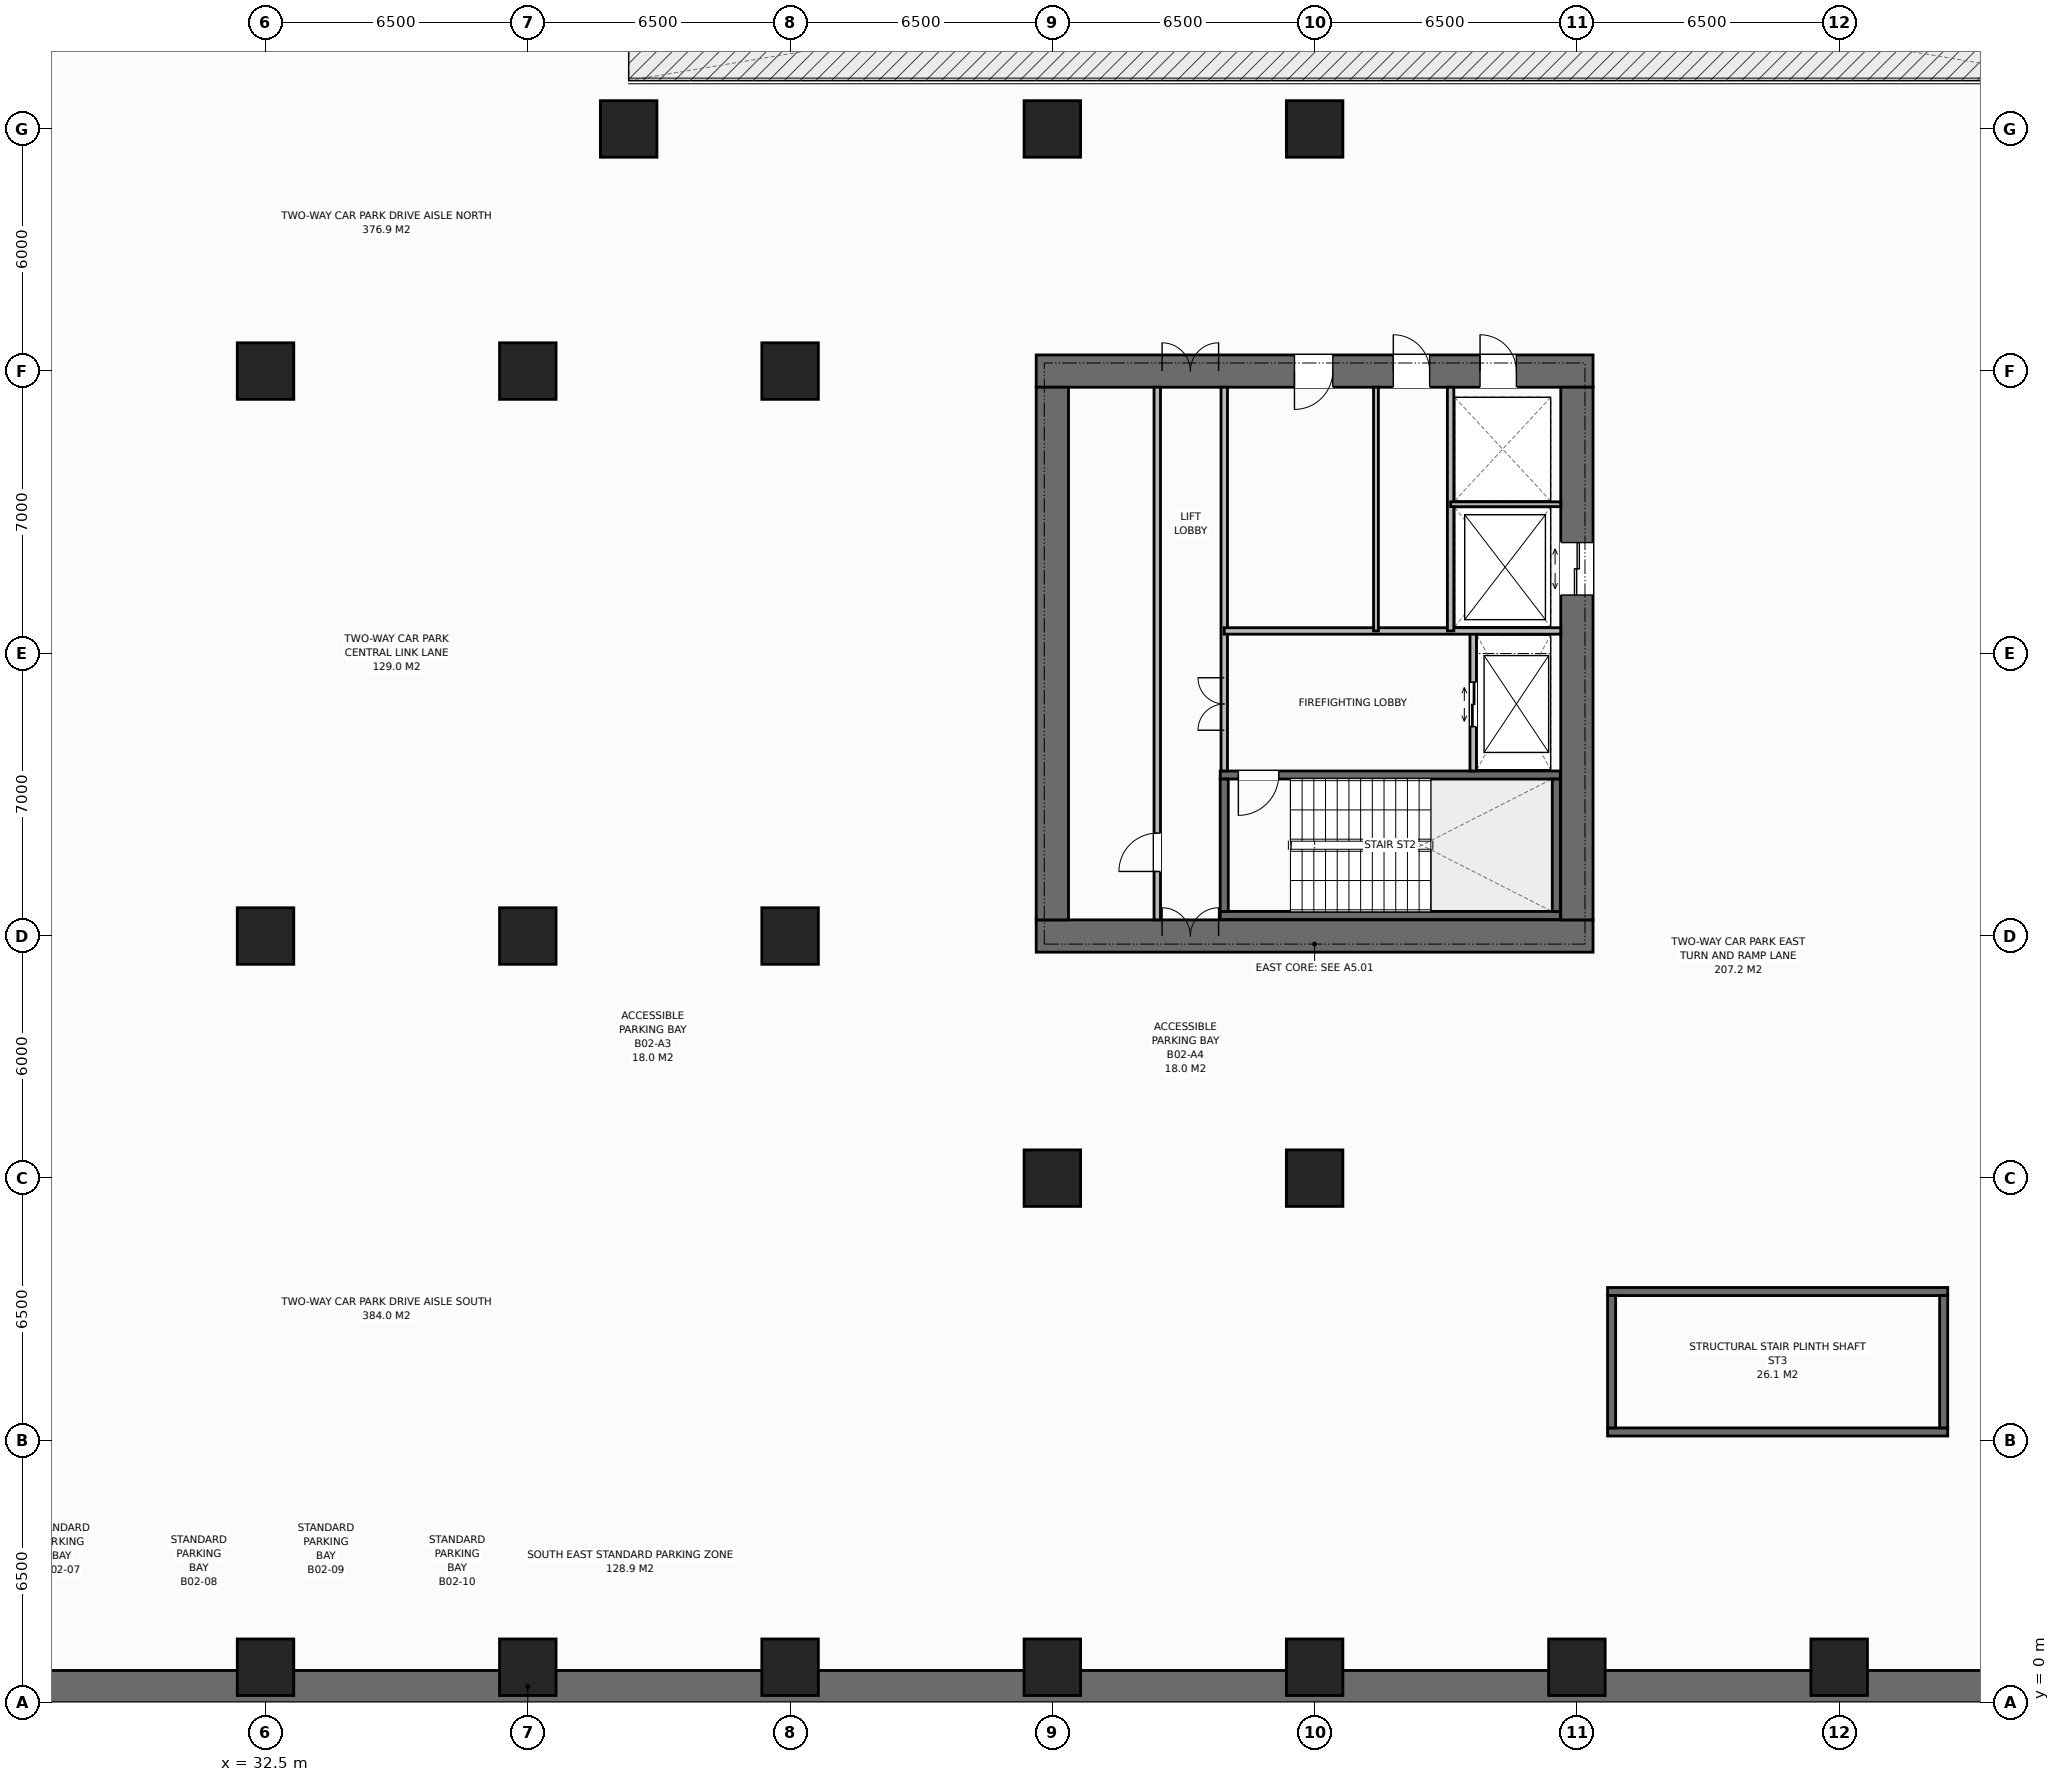
"""IFC4 building model, lengths in metres.
Left out: names, types, materials, properties, quantities, classifications, styles, units other than length and angle.
Written with IfcOpenShell. Run it as: python <this file> out.ifc"""

import sys

from ifc_helpers import new_model, si_unit, direction, frame, frame_2d, origin, origin_2d, place, context, subcontext, project, spatial, rectangle, extrude, element, fill, save


model = new_model("IFC4")
c1 = context("Model", 3, precision=1e-05, world=origin(), true_north=direction((0.0, 1.0)))
c2 = subcontext(c1, "Body", "Model", "MODEL_VIEW")
j1 = project(units=[si_unit("LENGTHUNIT", "METRE"), si_unit("PLANEANGLEUNIT", "RADIAN")], contexts=[c1])
p1 = place(None, origin())
s1 = spatial("IfcSite", under=j1, at=p1, CompositionType="ELEMENT")
p2 = place(p1, origin())
s2 = spatial("IfcBuilding", under=s1, at=p2, CompositionType="ELEMENT")
p3 = place(p2, frame((0.0, 0.0, -9.0)))
s3 = spatial("IfcBuildingStorey", under=s2, at=p3, CompositionType="ELEMENT", Elevation=-9.0)
p4 = place(p3, frame((-0.2, 0.4, 0.0), z_axis=(0.0, 0.0, 1.0), x_axis=(1.0, 0.0, 0.0)))
e1 = element("IfcWall", 1, at=p4, inside=s3, PredefinedType="USERDEFINED", context=c2, shape_type="SweptSolid", body=[
    extrude(rectangle(XDim=78.4, YDim=0.8, at=frame_2d((39.2, 0.0))), origin(), (0.0, 0.0, 1.0), 4.2),
])
p5 = place(p3, frame((51.6, 19.0, 0.0), z_axis=(0.0, 0.0, 1.0), x_axis=(1.0, 0.0, 0.0)))
e2 = element("IfcWall", 2, at=p5, inside=s3, PredefinedType="SHEAR", context=c2, shape_type="SweptSolid", body=[
    extrude(rectangle(XDim=13.8, YDim=0.8, at=frame_2d((6.9, 0.0))), origin(), (0.0, 0.0, 1.0), 4.5),
])
p6 = place(p5, frame((3.12, 0.0, 0.0)))
e3 = element("IfcOpeningElement", 3, at=p6, cuts=e2, PredefinedType="OPENING", context=c2, shape_type="SweptSolid", body=[
    extrude(rectangle(XDim=1.4, YDim=2.2, at=frame_2d((0.7, 1.1))), frame((0.0, 0.41, 0.0), z_axis=(0.0, -1.0, 0.0), x_axis=(1.0, 0.0, 0.0)), (0.0, 0.0, 1.0), 0.82),
])
p7 = place(p3, frame((51.6, 33.0, 0.0), z_axis=(0.0, 0.0, 1.0), x_axis=(1.0, 0.0, 0.0)))
e4 = element("IfcWall", 4, at=p7, inside=s3, PredefinedType="SHEAR", context=c2, shape_type="SweptSolid", body=[
    extrude(rectangle(XDim=13.8, YDim=0.8, at=frame_2d((6.9, 0.0))), origin(), (0.0, 0.0, 1.0), 4.5),
])
p8 = place(p7, frame((3.12, 0.0, 0.0)))
e5 = element("IfcOpeningElement", 5, at=p8, cuts=e4, PredefinedType="OPENING", context=c2, shape_type="SweptSolid", body=[
    extrude(rectangle(XDim=1.4, YDim=2.2, at=frame_2d((0.7, 1.1))), frame((0.0, 0.41, 0.0), z_axis=(0.0, -1.0, 0.0), x_axis=(1.0, 0.0, 0.0)), (0.0, 0.0, 1.0), 0.82),
])
p9 = place(p7, frame((11.0, 0.0, 0.0)))
e6 = element("IfcOpeningElement", 6, at=p9, cuts=e4, PredefinedType="OPENING", context=c2, shape_type="SweptSolid", body=[
    extrude(rectangle(XDim=0.9, YDim=2.15, at=frame_2d((0.45, 1.075))), frame((0.0, 0.41, 0.0), z_axis=(0.0, -1.0, 0.0), x_axis=(1.0, 0.0, 0.0)), (0.0, 0.0, 1.0), 0.82),
])
p10 = place(p7, frame((6.4, 0.0, 0.0)))
e7 = element("IfcOpeningElement", 7, at=p10, cuts=e4, PredefinedType="OPENING", context=c2, shape_type="SweptSolid", body=[
    extrude(rectangle(XDim=0.95, YDim=2.15, at=frame_2d((0.475, 1.075))), frame((0.0, 0.41, 0.0), z_axis=(0.0, -1.0, 0.0), x_axis=(1.0, 0.0, 0.0)), (0.0, 0.0, 1.0), 0.82),
])
p11 = place(p7, frame((8.85, 0.0, 0.0)))
e8 = element("IfcOpeningElement", 8, at=p11, cuts=e4, PredefinedType="OPENING", context=c2, shape_type="SweptSolid", body=[
    extrude(rectangle(XDim=0.9, YDim=2.15, at=frame_2d((0.45, 1.075))), frame((0.0, 0.41, 0.0), z_axis=(0.0, -1.0, 0.0), x_axis=(1.0, 0.0, 0.0)), (0.0, 0.0, 1.0), 0.82),
])
p12 = place(p3, frame((52.0, 19.4, 0.0), z_axis=(0.0, 0.0, 1.0), x_axis=(0.0, 1.0, 0.0)))
e9 = element("IfcWall", 9, at=p12, inside=s3, PredefinedType="SHEAR", context=c2, shape_type="SweptSolid", body=[
    extrude(rectangle(XDim=13.2, YDim=0.8, at=frame_2d((6.6, 0.0))), origin(), (0.0, 0.0, 1.0), 4.5),
])
p13 = place(p3, frame((65.0, 19.4, 0.0), z_axis=(0.0, 0.0, 1.0), x_axis=(0.0, 1.0, 0.0)))
e10 = element("IfcWall", 10, at=p13, inside=s3, PredefinedType="SHEAR", context=c2, shape_type="SweptSolid", body=[
    extrude(rectangle(XDim=13.2, YDim=0.8, at=frame_2d((6.6, 0.0))), origin(), (0.0, 0.0, 1.0), 4.5),
])
p14 = place(p13, frame((8.05, 0.0, 0.0)))
e11 = element("IfcOpeningElement", 11, at=p14, cuts=e10, PredefinedType="OPENING", context=c2, shape_type="SweptSolid", body=[
    extrude(rectangle(XDim=1.3, YDim=2.2, at=frame_2d((0.65, 1.1))), frame((0.0, 0.41, 0.0), z_axis=(0.0, -1.0, 0.0), x_axis=(1.0, 0.0, 0.0)), (0.0, 0.0, 1.0), 0.82),
])
p15 = place(p3, frame((56.16, 19.51, 0.0), z_axis=(0.0, 0.0, 1.0), x_axis=(1.0, 0.0, 0.0)))
e12 = element("IfcWall", 12, at=p15, inside=s3, PredefinedType="SHEAR", context=c2, shape_type="SweptSolid", body=[
    extrude(rectangle(XDim=8.43, YDim=0.2, at=frame_2d((4.215, 0.0))), origin(), (0.0, 0.0, 1.0), 4.5),
])
p16 = place(p3, frame((56.16, 22.99, 0.0), z_axis=(0.0, 0.0, 1.0), x_axis=(1.0, 0.0, 0.0)))
e13 = element("IfcWall", 13, at=p16, inside=s3, PredefinedType="SHEAR", context=c2, shape_type="SweptSolid", body=[
    extrude(rectangle(XDim=8.43, YDim=0.2, at=frame_2d((4.215, 0.0))), origin(), (0.0, 0.0, 1.0), 4.5),
])
p17 = place(p16, frame((0.45, 0.0, 0.0)))
e14 = element("IfcOpeningElement", 14, at=p17, cuts=e13, PredefinedType="OPENING", context=c2, shape_type="SweptSolid", body=[
    extrude(rectangle(XDim=1.0, YDim=2.15, at=frame_2d((0.5, 1.075))), frame((0.0, 0.11, 0.0), z_axis=(0.0, -1.0, 0.0), x_axis=(1.0, 0.0, 0.0)), (0.0, 0.0, 1.0), 0.22),
])
for number, where, z_axis, x_axis in (
    (15, (56.26, 19.61, 0.0), (0.0, 0.0, 1.0), (0.0, 1.0, 0.0)),
    (16, (64.49, 19.61, 0.0), (0.0, 0.0, 1.0), (0.0, 1.0, 0.0)),
):
    element("IfcWall", number, at=place(p3, frame(where, z_axis=z_axis, x_axis=x_axis)), inside=s3, PredefinedType="SHEAR", context=c2, shape_type="SweptSolid", body=[
        extrude(rectangle(XDim=3.28, YDim=0.2, at=frame_2d((1.64, 0.0))), origin(), (0.0, 0.0, 1.0), 4.5),
    ])
for number, where, z_axis, x_axis in (
    (17, (65.76, 6.71, 0.0), (0.0, 0.0, 1.0), (1.0, 0.0, 0.0)),
    (18, (65.76, 10.19, 0.0), (0.0, 0.0, 1.0), (1.0, 0.0, 0.0)),
):
    element("IfcWall", number, at=place(p3, frame(where, z_axis=z_axis, x_axis=x_axis)), inside=s3, PredefinedType="SHEAR", context=c2, shape_type="SweptSolid", body=[
        extrude(rectangle(XDim=8.43, YDim=0.2, at=frame_2d((4.215, 0.0))), origin(), (0.0, 0.0, 1.0), 4.5),
    ])
for number, where, z_axis, x_axis in (
    (19, (65.86, 6.81, 0.0), (0.0, 0.0, 1.0), (0.0, 1.0, 0.0)),
    (20, (74.09, 6.81, 0.0), (0.0, 0.0, 1.0), (0.0, 1.0, 0.0)),
):
    element("IfcWall", number, at=place(p3, frame(where, z_axis=z_axis, x_axis=x_axis)), inside=s3, PredefinedType="SHEAR", context=c2, shape_type="SweptSolid", body=[
        extrude(rectangle(XDim=3.28, YDim=0.2, at=frame_2d((1.64, 0.0))), origin(), (0.0, 0.0, 1.0), 4.5),
    ])
for number, where, z_axis, x_axis in (
    (21, (58.5, 13.0, 0.0), (0.0, 0.0, 1.0), (1.0, 0.0, 0.0)),
    (22, (58.5, 39.0, 0.0), (0.0, 0.0, 1.0), (1.0, 0.0, 0.0)),
    (23, (32.5, 19.0, 0.0), (0.0, 0.0, 1.0), (1.0, 0.0, 0.0)),
    (24, (32.5, 33.0, 0.0), (0.0, 0.0, 1.0), (1.0, 0.0, 0.0)),
    (25, (39.0, 19.0, 0.0), (0.0, 0.0, 1.0), (1.0, 0.0, 0.0)),
    (26, (39.0, 33.0, 0.0), (0.0, 0.0, 1.0), (1.0, 0.0, 0.0)),
    (27, (45.5, 19.0, 0.0), (0.0, 0.0, 1.0), (1.0, 0.0, 0.0)),
    (28, (45.5, 33.0, 0.0), (0.0, 0.0, 1.0), (1.0, 0.0, 0.0)),
    (29, (41.5, 39.0, 0.0), (0.0, 0.0, 1.0), (1.0, 0.0, 0.0)),
    (30, (52.0, 13.0, 0.0), (0.0, 0.0, 1.0), (1.0, 0.0, 0.0)),
    (31, (52.0, 39.0, 0.0), (0.0, 0.0, 1.0), (1.0, 0.0, 0.0)),
    (32, (32.5, 0.88, 0.0), (0.0, 0.0, 1.0), (1.0, 0.0, 0.0)),
    (33, (39.0, 0.88, 0.0), (0.0, 0.0, 1.0), (1.0, 0.0, 0.0)),
    (34, (45.5, 0.88, 0.0), (0.0, 0.0, 1.0), (1.0, 0.0, 0.0)),
    (35, (52.0, 0.88, 0.0), (0.0, 0.0, 1.0), (1.0, 0.0, 0.0)),
    (36, (58.5, 0.88, 0.0), (0.0, 0.0, 1.0), (1.0, 0.0, 0.0)),
    (37, (65.0, 0.88, 0.0), (0.0, 0.0, 1.0), (1.0, 0.0, 0.0)),
    (38, (71.5, 0.88, 0.0), (0.0, 0.0, 1.0), (1.0, 0.0, 0.0)),
):
    element("IfcColumn", number, at=place(p3, frame(where, z_axis=z_axis, x_axis=x_axis)), inside=s3, PredefinedType="COLUMN", context=c2, shape_type="SweptSolid", body=[
        extrude(rectangle(XDim=1.4, YDim=1.4, at=origin_2d()), origin(), (0.0, 0.0, 1.0), 4.5),
    ])
p18 = place(p3, frame((54.6, 19.4, 0.0), z_axis=(0.0, 0.0, 1.0), x_axis=(0.0, 1.0, 0.0)))
e39 = element("IfcWall", 39, at=p18, inside=s3, PredefinedType="STANDARD", context=c2, shape_type="SweptSolid", body=[
    extrude(rectangle(XDim=13.2, YDim=0.16, at=frame_2d((6.6, 0.0))), origin(), (0.0, 0.0, 1.0), 4.2),
])
p19 = place(p18, frame((1.2, 0.0, 0.0)))
e40 = element("IfcOpeningElement", 40, at=p19, cuts=e39, PredefinedType="OPENING", context=c2, shape_type="SweptSolid", body=[
    extrude(rectangle(XDim=0.95, YDim=2.15, at=frame_2d((0.475, 1.075))), frame((0.0, 0.09, 0.0), z_axis=(0.0, -1.0, 0.0), x_axis=(1.0, 0.0, 0.0)), (0.0, 0.0, 1.0), 0.18),
])
p20 = place(p3, frame((56.26, 23.09, 0.0), z_axis=(0.0, 0.0, 1.0), x_axis=(0.0, 1.0, 0.0)))
e41 = element("IfcWall", 41, at=p20, inside=s3, PredefinedType="STANDARD", context=c2, shape_type="SweptSolid", body=[
    extrude(rectangle(XDim=9.51, YDim=0.16, at=frame_2d((4.755, 0.0))), origin(), (0.0, 0.0, 1.0), 4.2),
])
p21 = place(p20, frame((1.01, 0.0, 0.0)))
e42 = element("IfcOpeningElement", 42, at=p21, cuts=e41, PredefinedType="OPENING", context=c2, shape_type="SweptSolid", body=[
    extrude(rectangle(XDim=1.3, YDim=2.2, at=frame_2d((0.65, 1.1))), frame((0.0, 0.09, 0.0), z_axis=(0.0, -1.0, 0.0), x_axis=(1.0, 0.0, 0.0)), (0.0, 0.0, 1.0), 0.18),
])
p22 = place(p3, frame((62.43, 23.09, 0.0), z_axis=(0.0, 0.0, 1.0), x_axis=(0.0, 1.0, 0.0)))
e43 = element("IfcWall", 43, at=p22, inside=s3, PredefinedType="STANDARD", context=c2, shape_type="SweptSolid", body=[
    extrude(rectangle(XDim=3.47, YDim=0.16, at=frame_2d((1.735, 0.0))), origin(), (0.0, 0.0, 1.0), 4.2),
])
p23 = place(p22, frame((1.1, 0.0, 0.0)))
e44 = element("IfcOpeningElement", 44, at=p23, cuts=e43, PredefinedType="OPENING", context=c2, shape_type="SweptSolid", body=[
    extrude(rectangle(XDim=1.1, YDim=2.2, at=frame_2d((0.55, 1.1))), frame((0.0, 0.09, 0.0), z_axis=(0.0, -1.0, 0.0), x_axis=(1.0, 0.0, 0.0)), (0.0, 0.0, 1.0), 0.18),
])
p24 = place(p3, frame((56.26, 26.56, 0.0), z_axis=(0.0, 0.0, 1.0), x_axis=(1.0, 0.0, 0.0)))
e45 = element("IfcWall", 45, at=p24, inside=s3, PredefinedType="STANDARD", context=c2, shape_type="SweptSolid", body=[
    extrude(rectangle(XDim=8.34, YDim=0.16, at=frame_2d((4.17, 0.0))), origin(), (0.0, 0.0, 1.0), 4.2),
])
p25 = place(p3, frame((61.87, 26.56, 0.0), z_axis=(0.0, 0.0, 1.0), x_axis=(0.0, 1.0, 0.0)))
e46 = element("IfcWall", 46, at=p25, inside=s3, PredefinedType="STANDARD", context=c2, shape_type="SweptSolid", body=[
    extrude(rectangle(XDim=6.04, YDim=0.16, at=frame_2d((3.02, 0.0))), origin(), (0.0, 0.0, 1.0), 4.2),
])
p26 = place(p3, frame((61.87, 29.7, 0.0), z_axis=(0.0, 0.0, 1.0), x_axis=(1.0, 0.0, 0.0)))
e47 = element("IfcWall", 47, at=p26, inside=s3, PredefinedType="PARTITIONING", context=c2, shape_type="SweptSolid", body=[
    extrude(rectangle(XDim=2.73, YDim=0.12, at=frame_2d((1.365, 0.0))), origin(), (0.0, 0.0, 1.0), 4.2),
])
p27 = place(p3, frame((60.02, 26.56, 0.0), z_axis=(0.0, 0.0, 1.0), x_axis=(0.0, 1.0, 0.0)))
e48 = element("IfcWall", 48, at=p27, inside=s3, PredefinedType="PARTITIONING", context=c2, shape_type="SweptSolid", body=[
    extrude(rectangle(XDim=6.04, YDim=0.12, at=frame_2d((3.02, 0.0))), origin(), (0.0, 0.0, 1.0), 4.2),
])
p28 = place(p6, origin())
e49 = element("IfcDoor", 49, at=p28, inside=s3, OperationType="DOUBLE_DOOR_SINGLE_SWING", PredefinedType="DOOR", context=c2, shape_type="SweptSolid", body=[
    extrude(rectangle(XDim=1.4, YDim=2.2, at=frame_2d((0.7, 1.1))), frame((0.0, 0.125, 0.0), z_axis=(0.0, -1.0, 0.0), x_axis=(1.0, 0.0, 0.0)), (0.0, 0.0, 1.0), 0.05),
])
fill(e3, e49)
p29 = place(p8, origin())
e50 = element("IfcDoor", 50, at=p29, inside=s3, OperationType="DOUBLE_DOOR_SINGLE_SWING", PredefinedType="DOOR", context=c2, shape_type="SweptSolid", body=[
    extrude(rectangle(XDim=1.4, YDim=2.2, at=frame_2d((0.7, 1.1))), frame((0.0, -0.075, 0.0), z_axis=(0.0, -1.0, 0.0), x_axis=(1.0, 0.0, 0.0)), (0.0, 0.0, 1.0), 0.05),
])
fill(e5, e50)
p30 = place(p19, origin())
e51 = element("IfcDoor", 51, at=p30, inside=s3, OperationType="SINGLE_SWING_LEFT", PredefinedType="DOOR", context=c2, shape_type="SweptSolid", body=[
    extrude(rectangle(XDim=0.95, YDim=2.15, at=frame_2d((0.475, 1.075))), frame((0.0, 0.025, 0.0), z_axis=(0.0, -1.0, 0.0), x_axis=(1.0, 0.0, 0.0)), (0.0, 0.0, 1.0), 0.05),
])
fill(e40, e51)
p31 = place(p17, origin())
e52 = element("IfcDoor", 52, at=p31, inside=s3, OperationType="SINGLE_SWING_RIGHT", PredefinedType="DOOR", context=c2, shape_type="SweptSolid", body=[
    extrude(rectangle(XDim=1.0, YDim=2.15, at=frame_2d((0.5, 1.075))), frame((0.0, 0.025, 0.0), z_axis=(0.0, -1.0, 0.0), x_axis=(1.0, 0.0, 0.0)), (0.0, 0.0, 1.0), 0.05),
])
fill(e14, e52)
p32 = place(p23, origin())
e53 = element("IfcDoor", 53, at=p32, inside=s3, OperationType="DOUBLE_DOOR_SLIDING", PredefinedType="DOOR", context=c2, shape_type="SweptSolid", body=[
    extrude(rectangle(XDim=1.1, YDim=2.2, at=frame_2d((0.55, 1.1))), frame((0.0, 0.025, 0.0), z_axis=(0.0, -1.0, 0.0), x_axis=(1.0, 0.0, 0.0)), (0.0, 0.0, 1.0), 0.05),
])
fill(e44, e53)
p33 = place(p21, origin())
e54 = element("IfcDoor", 54, at=p33, inside=s3, OperationType="DOUBLE_DOOR_SINGLE_SWING", PredefinedType="DOOR", context=c2, shape_type="SweptSolid", body=[
    extrude(rectangle(XDim=1.3, YDim=2.2, at=frame_2d((0.65, 1.1))), frame((0.0, 0.025, 0.0), z_axis=(0.0, -1.0, 0.0), x_axis=(1.0, 0.0, 0.0)), (0.0, 0.0, 1.0), 0.05),
])
fill(e42, e54)
p34 = place(p14, origin())
e55 = element("IfcDoor", 55, at=p34, inside=s3, OperationType="DOUBLE_DOOR_SLIDING", PredefinedType="DOOR", context=c2, shape_type="SweptSolid", body=[
    extrude(rectangle(XDim=1.3, YDim=2.2, at=frame_2d((0.65, 1.1))), frame((0.0, 0.025, 0.0), z_axis=(0.0, -1.0, 0.0), x_axis=(1.0, 0.0, 0.0)), (0.0, 0.0, 1.0), 0.05),
])
fill(e11, e55)
p35 = place(p9, origin())
e56 = element("IfcDoor", 56, at=p35, inside=s3, OperationType="SINGLE_SWING_LEFT", PredefinedType="DOOR", context=c2, shape_type="SweptSolid", body=[
    extrude(rectangle(XDim=0.9, YDim=2.15, at=frame_2d((0.45, 1.075))), frame((0.0, -0.075, 0.0), z_axis=(0.0, -1.0, 0.0), x_axis=(1.0, 0.0, 0.0)), (0.0, 0.0, 1.0), 0.05),
])
fill(e6, e56)
p36 = place(p10, origin())
e57 = element("IfcDoor", 57, at=p36, inside=s3, OperationType="SINGLE_SWING_RIGHT", PredefinedType="DOOR", context=c2, shape_type="SweptSolid", body=[
    extrude(rectangle(XDim=0.95, YDim=2.15, at=frame_2d((0.475, 1.075))), frame((0.0, -0.075, 0.0), z_axis=(0.0, -1.0, 0.0), x_axis=(1.0, 0.0, 0.0)), (0.0, 0.0, 1.0), 0.05),
])
fill(e7, e57)
p37 = place(p11, origin())
e58 = element("IfcDoor", 58, at=p37, inside=s3, OperationType="SINGLE_SWING_LEFT", PredefinedType="DOOR", context=c2, shape_type="SweptSolid", body=[
    extrude(rectangle(XDim=0.9, YDim=2.15, at=frame_2d((0.45, 1.075))), frame((0.0, -0.075, 0.0), z_axis=(0.0, -1.0, 0.0), x_axis=(1.0, 0.0, 0.0)), (0.0, 0.0, 1.0), 0.05),
])
fill(e8, e58)
save(model, sys.argv[1])
